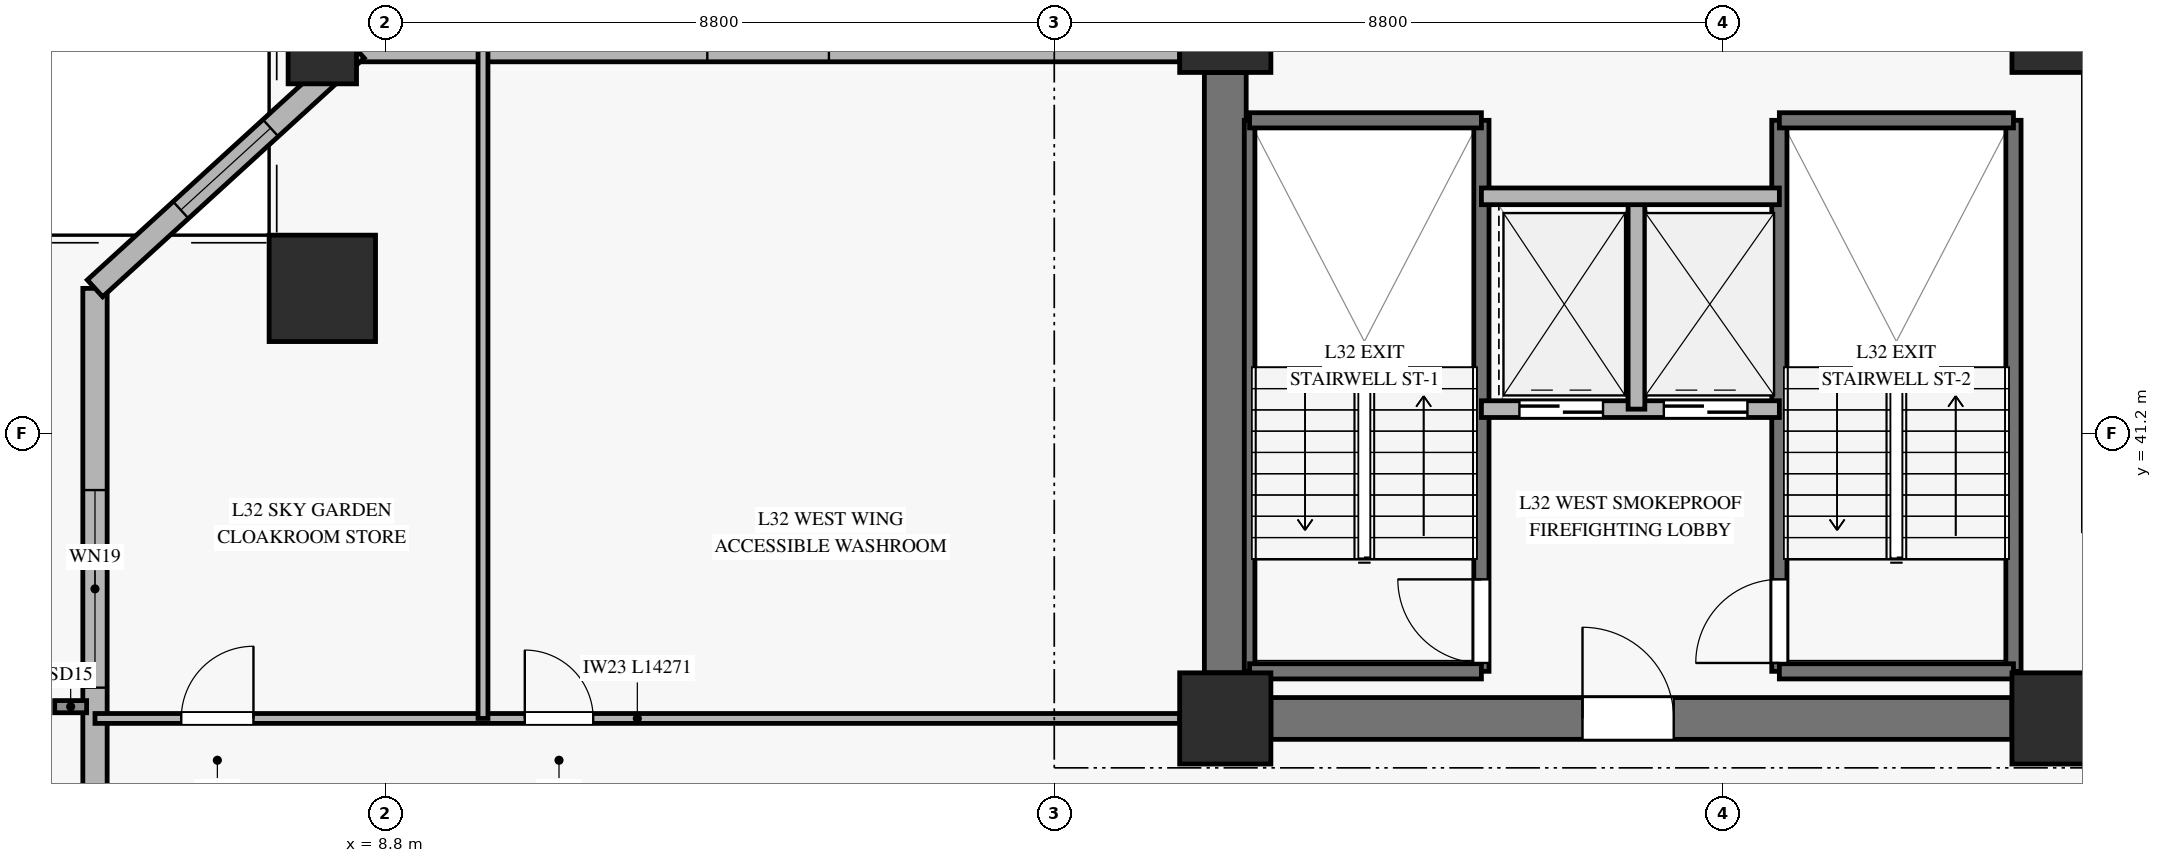
"""IFC4 building model, lengths in metres.
Left out: names, types, materials, properties, quantities, classifications, styles, units other than length and angle.
Written with IfcOpenShell. Run it as: python <this file> out.ifc"""

import sys

from ifc_helpers import new_model, si_unit, direction, frame, frame_2d, origin, origin_2d, place, context, subcontext, project, spatial, rectangle, hollow_rectangle, extrude, source, transform, mapped, element, fill, save


model = new_model("IFC4")
c1 = context("Model", 3, precision=1e-05, world=origin(), true_north=direction((0.0, 1.0)))
c2 = subcontext(c1, "Body", "Model", "MODEL_VIEW")
j1 = project(units=[si_unit("LENGTHUNIT", "METRE"), si_unit("PLANEANGLEUNIT", "RADIAN")], contexts=[c1])
p1 = place(None, origin())
s1 = spatial("IfcSite", under=j1, at=p1, CompositionType="ELEMENT")
p2 = place(p1, origin())
s2 = spatial("IfcBuilding", under=s1, at=p2, CompositionType="ELEMENT")
p3 = place(p2, frame((0.0, 0.0, 130.9)))
s3 = spatial("IfcBuildingStorey", under=s2, at=p3, CompositionType="ELEMENT", Elevation=130.9)
m1 = source(origin(), c2, "Body", "SweptSolid", [
    extrude(rectangle(XDim=1.2, YDim=1.2, at=origin_2d()), origin(), (0.0, 0.0, 1.0), 6.57),
])
for number, where, z_axis, x_axis in (
    (1, (19.85, 37.45, 0.0), (0.0, 0.0, 1.0), (1.0, 0.0, 0.0)),
    (2, (19.85, 46.55, 0.0), (0.0, 0.0, 1.0), (1.0, 0.0, 0.0)),
    (3, (30.8, 37.45, 0.0), (0.0, 0.0, 1.0), (1.0, 0.0, 0.0)),
    (4, (30.8, 46.55, 0.0), (0.0, 0.0, 1.0), (1.0, 0.0, 0.0)),
):
    element("IfcColumn", number, at=place(p3, frame(where, z_axis=z_axis, x_axis=x_axis)), inside=s3, PredefinedType="PILASTER", context=c2, shape_type="MappedRepresentation", body=[
        mapped(m1, transform((0.0, 0.0, 0.0), x_axis=(1.0, 0.0, 0.0), y_axis=(0.0, 1.0, 0.0), z_axis=(0.0, 0.0, 1.0), scale=1.0)),
    ])
p4 = place(p3, frame((20.45, 37.45, 0.0), z_axis=(0.0, 0.0, 1.0), x_axis=(1.0, 0.0, 0.0)))
e5 = element("IfcWall", 5, at=p4, inside=s3, PredefinedType="SHEAR", context=c2, shape_type="SweptSolid", body=[
    extrude(rectangle(XDim=9.75, YDim=0.55, at=frame_2d((4.875, 0.0))), origin(), (0.0, 0.0, 1.0), 6.57),
])
p5 = place(p4, frame((4.1, 0.0, 0.0)))
e6 = element("IfcOpeningElement", 6, at=p5, cuts=e5, PredefinedType="OPENING", context=c2, shape_type="SweptSolid", body=[
    extrude(rectangle(XDim=1.2, YDim=2.15, at=frame_2d((0.6, 1.075))), frame((0.0, 0.285, 0.0), z_axis=(0.0, -1.0, 0.0), x_axis=(1.0, 0.0, 0.0)), (0.0, 0.0, 1.0), 0.57),
])
p6 = place(p3, frame((19.85, 38.05, 0.0), z_axis=(0.0, 0.0, 1.0), x_axis=(0.0, 1.0, 0.0)))
e7 = element("IfcWall", 7, at=p6, inside=s3, PredefinedType="SHEAR", context=c2, shape_type="SweptSolid", body=[
    extrude(rectangle(XDim=7.9, YDim=0.55, at=frame_2d((3.95, 0.0))), origin(), (0.0, 0.0, 1.0), 6.57),
])
m2 = source(origin(), c2, "Body", "SweptSolid", [
    extrude(hollow_rectangle(XDim=1.4, YDim=1.4, WallThickness=0.065, at=origin_2d()), origin(), (0.0, 0.0, 1.0), 6.573),
])
p7 = place(p3, frame((7.97, 43.109, 0.0), z_axis=(0.031792241999, 0.003825468371, 0.999487178077), x_axis=(-0.119465364478, 0.992838368865, 0.0)))
e8 = element("IfcColumn", 8, at=p7, inside=s3, PredefinedType="COLUMN", context=c2, shape_type="MappedRepresentation", body=[
    mapped(m2, transform((0.0, 0.0, 0.0), x_axis=(1.0, 0.0, 0.0), y_axis=(0.0, 1.0, 0.0), z_axis=(0.0, 0.0, 1.0), scale=1.0)),
])
m3 = source(origin(), c2, "Body", "SweptSolid", [
    extrude(hollow_rectangle(XDim=0.9, YDim=0.9, WallThickness=0.04, at=origin_2d()), origin(), (0.0, 0.0, 1.0), 6.573),
])
p8 = place(p3, frame((7.97, 46.25, 0.0), z_axis=(0.031792474629, 0.0, 0.999494491509), x_axis=(0.0, 1.0, 0.0)))
e9 = element("IfcColumn", 9, at=p8, inside=s3, PredefinedType="COLUMN", context=c2, shape_type="MappedRepresentation", body=[
    mapped(m3, transform((0.0, 0.0, 0.0), x_axis=(1.0, 0.0, 0.0), y_axis=(0.0, 1.0, 0.0), z_axis=(0.0, 0.0, 1.0), scale=1.0)),
])
p9 = place(p3, frame((4.979, 27.259, 0.0), z_axis=(0.0, 0.0, 1.0), x_axis=(0.0, 1.0, 0.0)))
e10 = element("IfcWall", 10, at=p9, inside=s3, PredefinedType="SOLIDWALL", context=c2, shape_type="SweptSolid", body=[
    extrude(rectangle(XDim=15.85, YDim=0.32, at=frame_2d((7.925, 0.0))), origin(), (0.0, 0.0, 1.0), 6.05),
])
p10 = place(p9, frame((10.596, 0.0, 0.45)))
e11 = element("IfcOpeningElement", 11, at=p10, cuts=e10, PredefinedType="OPENING", context=c2, shape_type="SweptSolid", body=[
    extrude(rectangle(XDim=2.6, YDim=2.4, at=frame_2d((1.3, 1.2))), frame((0.0, 0.17, 0.0), z_axis=(0.0, -1.0, 0.0), x_axis=(1.0, 0.0, 0.0)), (0.0, 0.0, 1.0), 0.34),
])
p11 = place(p3, frame((8.42, 46.25, 0.0), z_axis=(0.0, 0.0, 1.0), x_axis=(1.0, 0.0, 0.0)))
e12 = element("IfcWall", 12, at=p11, inside=s3, PredefinedType="SOLIDWALL", context=c2, shape_type="SweptSolid", body=[
    extrude(rectangle(XDim=10.83, YDim=0.32, at=frame_2d((5.415, 0.0))), origin(), (0.0, 0.0, 1.0), 6.05),
])
p12 = place(p11, frame((4.615, 0.0, 0.45)))
e13 = element("IfcOpeningElement", 13, at=p12, cuts=e12, PredefinedType="OPENING", context=c2, shape_type="SweptSolid", body=[
    extrude(rectangle(XDim=1.6, YDim=2.0, at=frame_2d((0.8, 1.0))), frame((0.0, 0.17, 0.0), z_axis=(0.0, -1.0, 0.0), x_axis=(1.0, 0.0, 0.0)), (0.0, 0.0, 1.0), 0.34),
])
p13 = place(p3, frame((8.42, 46.25, 0.0), z_axis=(0.0, 0.0, 1.0), x_axis=(-0.738549020912, -0.674199780265, 0.0)))
e14 = element("IfcWall", 14, at=p13, inside=s3, PredefinedType="SOLIDWALL", context=c2, shape_type="SweptSolid", body=[
    extrude(rectangle(XDim=4.659, YDim=0.3, at=frame_2d((2.33, 0.0))), origin(), (0.0, 0.0, 1.0), 6.05),
])
p14 = place(p13, frame((1.53, 0.0, 0.45)))
e15 = element("IfcOpeningElement", 15, at=p14, cuts=e14, PredefinedType="OPENING", context=c2, shape_type="SweptSolid", body=[
    extrude(rectangle(XDim=1.6, YDim=2.0, at=frame_2d((0.8, 1.0))), frame((0.0, 0.16, 0.0), z_axis=(0.0, -1.0, 0.0), x_axis=(1.0, 0.0, 0.0)), (0.0, 0.0, 1.0), 0.32),
])
p15 = place(p3, frame((20.17, 38.07, 0.0), z_axis=(0.0, 0.0, 1.0), x_axis=(0.0, 1.0, 0.0)))
e16 = element("IfcWall", 16, at=p15, inside=s3, PredefinedType="SOLIDWALL", context=c2, shape_type="SweptSolid", body=[
    extrude(rectangle(XDim=7.25, YDim=0.14, at=frame_2d((3.625, 0.0))), origin(), (0.0, 0.0, 1.0), 6.8),
])
p16 = place(p3, frame((23.22, 38.07, 0.0), z_axis=(0.0, 0.0, 1.0), x_axis=(0.0, 1.0, 0.0)))
e17 = element("IfcWall", 17, at=p16, inside=s3, PredefinedType="SOLIDWALL", context=c2, shape_type="SweptSolid", body=[
    extrude(rectangle(XDim=7.25, YDim=0.2, at=frame_2d((3.625, 0.0))), origin(), (0.0, 0.0, 1.0), 6.8),
])
p17 = place(p16, frame((0.11, 0.0, 0.0)))
e18 = element("IfcOpeningElement", 18, at=p17, cuts=e17, PredefinedType="OPENING", context=c2, shape_type="SweptSolid", body=[
    extrude(rectangle(XDim=1.1, YDim=2.15, at=frame_2d((0.55, 1.075))), frame((0.0, 0.11, 0.0), z_axis=(0.0, -1.0, 0.0), x_axis=(1.0, 0.0, 0.0)), (0.0, 0.0, 1.0), 0.22),
])
for number, where, z_axis, x_axis in (
    (19, (20.17, 45.32, 0.0), (0.0, 0.0, 1.0), (1.0, 0.0, 0.0)),
    (20, (20.17, 38.07, 0.0), (0.0, 0.0, 1.0), (1.0, 0.0, 0.0)),
):
    element("IfcWall", number, at=place(p3, frame(where, z_axis=z_axis, x_axis=x_axis)), inside=s3, PredefinedType="SOLIDWALL", context=c2, shape_type="SweptSolid", body=[
        extrude(rectangle(XDim=3.05, YDim=0.2, at=frame_2d((1.525, 0.0))), origin(), (0.0, 0.0, 1.0), 6.8),
    ])
p18 = place(p3, frame((27.14, 38.07, 0.0), z_axis=(0.0, 0.0, 1.0), x_axis=(0.0, 1.0, 0.0)))
e21 = element("IfcWall", 21, at=p18, inside=s3, PredefinedType="SOLIDWALL", context=c2, shape_type="SweptSolid", body=[
    extrude(rectangle(XDim=7.25, YDim=0.2, at=frame_2d((3.625, 0.0))), origin(), (0.0, 0.0, 1.0), 6.8),
])
p19 = place(p18, frame((0.11, 0.0, 0.0)))
e22 = element("IfcOpeningElement", 22, at=p19, cuts=e21, PredefinedType="OPENING", context=c2, shape_type="SweptSolid", body=[
    extrude(rectangle(XDim=1.1, YDim=2.15, at=frame_2d((0.55, 1.075))), frame((0.0, 0.11, 0.0), z_axis=(0.0, -1.0, 0.0), x_axis=(1.0, 0.0, 0.0)), (0.0, 0.0, 1.0), 0.22),
])
p20 = place(p3, frame((30.22, 38.07, 0.0), z_axis=(0.0, 0.0, 1.0), x_axis=(0.0, 1.0, 0.0)))
e23 = element("IfcWall", 23, at=p20, inside=s3, PredefinedType="SOLIDWALL", context=c2, shape_type="SweptSolid", body=[
    extrude(rectangle(XDim=7.25, YDim=0.2, at=frame_2d((3.625, 0.0))), origin(), (0.0, 0.0, 1.0), 6.8),
])
for number, where, z_axis, x_axis in (
    (24, (27.14, 45.32, 0.0), (0.0, 0.0, 1.0), (1.0, 0.0, 0.0)),
    (25, (27.14, 38.07, 0.0), (0.0, 0.0, 1.0), (1.0, 0.0, 0.0)),
):
    element("IfcWall", number, at=place(p3, frame(where, z_axis=z_axis, x_axis=x_axis)), inside=s3, PredefinedType="SOLIDWALL", context=c2, shape_type="SweptSolid", body=[
        extrude(rectangle(XDim=3.08, YDim=0.2, at=frame_2d((1.54, 0.0))), origin(), (0.0, 0.0, 1.0), 6.8),
    ])
p21 = place(p3, frame((23.22, 41.52, 0.0), z_axis=(0.0, 0.0, 1.0), x_axis=(1.0, 0.0, 0.0)))
e26 = element("IfcWall", 26, at=p21, inside=s3, PredefinedType="SOLIDWALL", context=c2, shape_type="SweptSolid", body=[
    extrude(rectangle(XDim=3.92, YDim=0.22, at=frame_2d((1.96, 0.0))), origin(), (0.0, 0.0, 1.0), 6.57),
])
p22 = place(p21, frame((0.5, 0.0, 0.0)))
e27 = element("IfcOpeningElement", 27, at=p22, cuts=e26, PredefinedType="OPENING", context=c2, shape_type="SweptSolid", body=[
    extrude(rectangle(XDim=1.1, YDim=2.2, at=frame_2d((0.55, 1.1))), frame((0.0, 0.12, 0.0), z_axis=(0.0, -1.0, 0.0), x_axis=(1.0, 0.0, 0.0)), (0.0, 0.0, 1.0), 0.24),
])
p23 = place(p21, frame((2.4, 0.0, 0.0)))
e28 = element("IfcOpeningElement", 28, at=p23, cuts=e26, PredefinedType="OPENING", context=c2, shape_type="SweptSolid", body=[
    extrude(rectangle(XDim=1.1, YDim=2.2, at=frame_2d((0.55, 1.1))), frame((0.0, 0.12, 0.0), z_axis=(0.0, -1.0, 0.0), x_axis=(1.0, 0.0, 0.0)), (0.0, 0.0, 1.0), 0.24),
])
p24 = place(p3, frame((25.26, 41.52, 0.0), z_axis=(0.0, 0.0, 1.0), x_axis=(0.0, 1.0, 0.0)))
e29 = element("IfcWall", 29, at=p24, inside=s3, PredefinedType="SOLIDWALL", context=c2, shape_type="SweptSolid", body=[
    extrude(rectangle(XDim=2.8, YDim=0.22, at=frame_2d((1.4, 0.0))), origin(), (0.0, 0.0, 1.0), 6.57),
])
p25 = place(p3, frame((23.22, 44.32, 0.0), z_axis=(0.0, 0.0, 1.0), x_axis=(1.0, 0.0, 0.0)))
e30 = element("IfcWall", 30, at=p25, inside=s3, PredefinedType="SOLIDWALL", context=c2, shape_type="SweptSolid", body=[
    extrude(rectangle(XDim=3.92, YDim=0.22, at=frame_2d((1.96, 0.0))), origin(), (0.0, 0.0, 1.0), 6.57),
])
p26 = place(p3, frame((4.979, 37.45, 0.0), z_axis=(0.0, 0.0, 1.0), x_axis=(1.0, 0.0, 0.0)))
e31 = element("IfcWall", 31, at=p26, inside=s3, PredefinedType="PARTITIONING", context=c2, shape_type="SweptSolid", body=[
    extrude(rectangle(XDim=14.271, YDim=0.13, at=frame_2d((7.135, 0.0))), origin(), (0.0, 0.0, 1.0), 6.055),
])
p27 = place(p26, frame((1.135, 0.0, 0.0)))
e32 = element("IfcOpeningElement", 32, at=p27, cuts=e31, PredefinedType="OPENING", context=c2, shape_type="SweptSolid", body=[
    extrude(rectangle(XDim=0.95, YDim=2.1, at=frame_2d((0.475, 1.05))), frame((0.0, 0.075, 0.0), z_axis=(0.0, -1.0, 0.0), x_axis=(1.0, 0.0, 0.0)), (0.0, 0.0, 1.0), 0.15),
])
p28 = place(p26, frame((5.655, 0.0, 0.0)))
e33 = element("IfcOpeningElement", 33, at=p28, cuts=e31, PredefinedType="OPENING", context=c2, shape_type="SweptSolid", body=[
    extrude(rectangle(XDim=0.9, YDim=2.1, at=frame_2d((0.45, 1.05))), frame((0.0, 0.075, 0.0), z_axis=(0.0, -1.0, 0.0), x_axis=(1.0, 0.0, 0.0)), (0.0, 0.0, 1.0), 0.15),
])
p29 = place(p3, frame((10.084, 37.45, 0.0), z_axis=(0.0, 0.0, 1.0), x_axis=(0.0, 1.0, 0.0)))
e34 = element("IfcWall", 34, at=p29, inside=s3, PredefinedType="PARTITIONING", context=c2, shape_type="SweptSolid", body=[
    extrude(rectangle(XDim=8.8, YDim=0.13, at=frame_2d((4.4, 0.0))), origin(), (0.0, 0.0, 1.0), 6.57),
])
m4 = source(origin(), c2, "Body", "SweptSolid", [
    extrude(rectangle(XDim=2.6, YDim=2.4, at=frame_2d((1.3, 1.2))), frame((0.0, 0.03, 0.0), z_axis=(0.0, -1.0, 0.0), x_axis=(1.0, 0.0, 0.0)), (0.0, 0.0, 1.0), 0.06),
])
p30 = place(p10, origin())
e35 = element("IfcWindow", 35, at=p30, inside=s3, PartitioningType="SINGLE_PANEL", PredefinedType="WINDOW", context=c2, shape_type="MappedRepresentation", body=[
    mapped(m4, transform((0.0, 0.0, 0.0), x_axis=(1.0, 0.0, 0.0), y_axis=(0.0, 1.0, 0.0), z_axis=(0.0, 0.0, 1.0), scale=1.0)),
])
fill(e11, e35)
m5 = source(origin(), c2, "Body", "SweptSolid", [
    extrude(rectangle(XDim=1.6, YDim=2.0, at=frame_2d((0.8, 1.0))), frame((0.0, 0.03, 0.0), z_axis=(0.0, -1.0, 0.0), x_axis=(1.0, 0.0, 0.0)), (0.0, 0.0, 1.0), 0.06),
])
p31 = place(p14, origin())
e36 = element("IfcWindow", 36, at=p31, inside=s3, PartitioningType="SINGLE_PANEL", PredefinedType="WINDOW", context=c2, shape_type="MappedRepresentation", body=[
    mapped(m5, transform((0.0, 0.0, 0.0), x_axis=(1.0, 0.0, 0.0), y_axis=(0.0, 1.0, 0.0), z_axis=(0.0, 0.0, 1.0), scale=1.0)),
])
fill(e15, e36)
m6 = source(origin(), c2, "Body", "SweptSolid", [
    extrude(rectangle(XDim=1.1, YDim=2.15, at=frame_2d((0.55, 1.075))), frame((0.0, 0.025, 0.0), z_axis=(0.0, -1.0, 0.0), x_axis=(1.0, 0.0, 0.0)), (0.0, 0.0, 1.0), 0.05),
])
p32 = place(p17, origin())
e37 = element("IfcDoor", 37, at=p32, inside=s3, OperationType="SINGLE_SWING_RIGHT", PredefinedType="DOOR", context=c2, shape_type="MappedRepresentation", body=[
    mapped(m6, transform((0.0, 0.0, 0.0), x_axis=(1.0, 0.0, 0.0), y_axis=(0.0, 1.0, 0.0), z_axis=(0.0, 0.0, 1.0), scale=1.0)),
])
fill(e18, e37)
p33 = place(p19, origin())
e38 = element("IfcDoor", 38, at=p33, inside=s3, OperationType="SINGLE_SWING_LEFT", PredefinedType="DOOR", context=c2, shape_type="MappedRepresentation", body=[
    mapped(m6, transform((0.0, 0.0, 0.0), x_axis=(1.0, 0.0, 0.0), y_axis=(0.0, 1.0, 0.0), z_axis=(0.0, 0.0, 1.0), scale=1.0)),
])
fill(e22, e38)
m7 = source(origin(), c2, "Body", "SweptSolid", [
    extrude(rectangle(XDim=1.1, YDim=2.2, at=frame_2d((0.55, 1.1))), frame((0.0, 0.025, 0.0), z_axis=(0.0, -1.0, 0.0), x_axis=(1.0, 0.0, 0.0)), (0.0, 0.0, 1.0), 0.05),
])
p34 = place(p22, origin())
e39 = element("IfcDoor", 39, at=p34, inside=s3, OperationType="SLIDING_TO_LEFT", PredefinedType="DOOR", context=c2, shape_type="MappedRepresentation", body=[
    mapped(m7, transform((0.0, 0.0, 0.0), x_axis=(1.0, 0.0, 0.0), y_axis=(0.0, 1.0, 0.0), z_axis=(0.0, 0.0, 1.0), scale=1.0)),
])
fill(e27, e39)
p35 = place(p23, origin())
e40 = element("IfcDoor", 40, at=p35, inside=s3, OperationType="SLIDING_TO_LEFT", PredefinedType="DOOR", context=c2, shape_type="MappedRepresentation", body=[
    mapped(m7, transform((0.0, 0.0, 0.0), x_axis=(1.0, 0.0, 0.0), y_axis=(0.0, 1.0, 0.0), z_axis=(0.0, 0.0, 1.0), scale=1.0)),
])
fill(e28, e40)
m8 = source(origin(), c2, "Body", "SweptSolid", [
    extrude(rectangle(XDim=1.2, YDim=2.15, at=frame_2d((0.6, 1.075))), frame((0.0, 0.025, 0.0), z_axis=(0.0, -1.0, 0.0), x_axis=(1.0, 0.0, 0.0)), (0.0, 0.0, 1.0), 0.05),
])
p36 = place(p5, origin())
e41 = element("IfcDoor", 41, at=p36, inside=s3, OperationType="SINGLE_SWING_LEFT", PredefinedType="DOOR", context=c2, shape_type="MappedRepresentation", body=[
    mapped(m8, transform((0.0, 0.0, 0.0), x_axis=(1.0, 0.0, 0.0), y_axis=(0.0, 1.0, 0.0), z_axis=(0.0, 0.0, 1.0), scale=1.0)),
])
fill(e6, e41)
m9 = source(origin(), c2, "Body", "SweptSolid", [
    extrude(rectangle(XDim=0.95, YDim=2.1, at=frame_2d((0.475, 1.05))), frame((0.0, 0.025, 0.0), z_axis=(0.0, -1.0, 0.0), x_axis=(1.0, 0.0, 0.0)), (0.0, 0.0, 1.0), 0.05),
])
p37 = place(p27, origin())
e42 = element("IfcDoor", 42, at=p37, inside=s3, OperationType="SINGLE_SWING_RIGHT", PredefinedType="DOOR", context=c2, shape_type="MappedRepresentation", body=[
    mapped(m9, transform((0.0, 0.0, 0.0), x_axis=(1.0, 0.0, 0.0), y_axis=(0.0, 1.0, 0.0), z_axis=(0.0, 0.0, 1.0), scale=1.0)),
])
fill(e32, e42)
m10 = source(origin(), c2, "Body", "SweptSolid", [
    extrude(rectangle(XDim=0.9, YDim=2.1, at=frame_2d((0.45, 1.05))), frame((0.0, 0.025, 0.0), z_axis=(0.0, -1.0, 0.0), x_axis=(1.0, 0.0, 0.0)), (0.0, 0.0, 1.0), 0.05),
])
p38 = place(p28, origin())
e43 = element("IfcDoor", 43, at=p38, inside=s3, OperationType="SINGLE_SWING_LEFT", PredefinedType="DOOR", context=c2, shape_type="MappedRepresentation", body=[
    mapped(m10, transform((0.0, 0.0, 0.0), x_axis=(1.0, 0.0, 0.0), y_axis=(0.0, 1.0, 0.0), z_axis=(0.0, 0.0, 1.0), scale=1.0)),
])
fill(e33, e43)
save(model, sys.argv[1])
